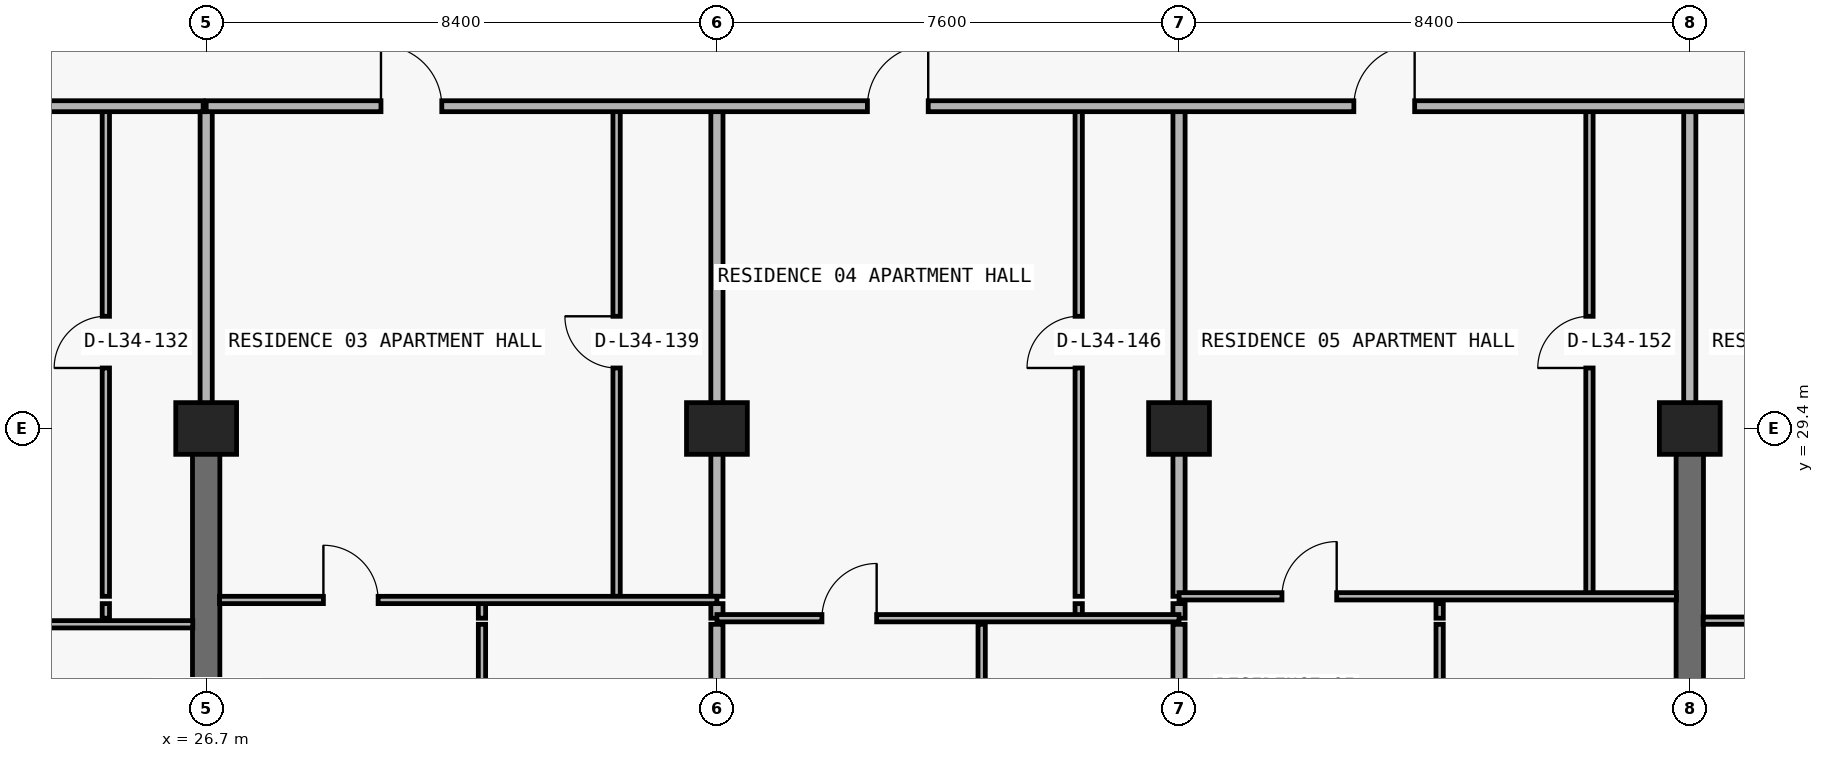
"""IFC4 building model, lengths in metres.
Left out: names, types, materials, properties, quantities, classifications, styles, units other than length and angle.
Written with IfcOpenShell. Run it as: python <this file> out.ifc"""

import sys

from ifc_helpers import new_model, si_unit, direction, frame, frame_2d, origin, origin_2d, place, context, subcontext, project, spatial, rectangle, extrude, element, fill, save


model = new_model("IFC4")
c1 = context("Model", 3, precision=1e-05, world=origin(), true_north=direction((0.0, 1.0)))
c2 = subcontext(c1, "Body", "Model", "MODEL_VIEW")
j1 = project(units=[si_unit("LENGTHUNIT", "METRE"), si_unit("PLANEANGLEUNIT", "RADIAN")], contexts=[c1])
p1 = place(None, origin())
s1 = spatial("IfcSite", under=j1, at=p1, CompositionType="ELEMENT")
p2 = place(p1, origin())
s2 = spatial("IfcBuilding", under=s1, at=p2, CompositionType="ELEMENT")
p3 = place(p2, frame((0.0, 0.0, 125.7)))
s3 = spatial("IfcBuildingStorey", under=s2, at=p3, CompositionType="ELEMENT", Elevation=125.7)
for number, where, z_axis, x_axis in (
    (1, (26.7, 29.4, 0.0), (0.0, 0.0, 1.0), (1.0, 0.0, 0.0)),
    (2, (35.1, 29.4, 0.0), (0.0, 0.0, 1.0), (1.0, 0.0, 0.0)),
    (3, (42.7, 29.4, 0.0), (0.0, 0.0, 1.0), (1.0, 0.0, 0.0)),
    (4, (51.1, 29.4, 0.0), (0.0, 0.0, 1.0), (1.0, 0.0, 0.0)),
):
    element("IfcColumn", number, at=place(p3, frame(where, z_axis=z_axis, x_axis=x_axis)), inside=s3, PredefinedType="COLUMN", context=c2, shape_type="SweptSolid", body=[
        extrude(rectangle(XDim=1.0, YDim=0.85, at=origin_2d()), origin(), (0.0, 0.0, 1.0), 3.05),
    ])
for number, where, z_axis, x_axis in (
    (5, (26.7, 20.8, 0.0), (0.0, 0.0, 1.0), (0.0, 1.0, 0.0)),
    (6, (51.1, 20.8, 0.0), (0.0, 0.0, 1.0), (0.0, 1.0, 0.0)),
):
    element("IfcWall", number, at=place(p3, frame(where, z_axis=z_axis, x_axis=x_axis)), inside=s3, PredefinedType="SHEAR", context=c2, shape_type="SweptSolid", body=[
        extrude(rectangle(XDim=8.6, YDim=0.45, at=frame_2d((4.3, 0.0))), origin(), (0.0, 0.0, 1.0), 3.05),
    ])
p4 = place(p3, frame((25.05, 26.28, 0.0), z_axis=(0.0, 0.0, 1.0), x_axis=(0.0, 1.0, 0.0)))
e7 = element("IfcWall", 7, at=p4, inside=s3, PredefinedType="PARTITIONING", context=c2, shape_type="SweptSolid", body=[
    extrude(rectangle(XDim=0.24, YDim=0.12, at=frame_2d((0.12, 0.0))), origin(), (0.0, 0.0, 1.0), 3.05),
])
p5 = place(p3, frame((25.05, 26.64, 0.0), z_axis=(0.0, 0.0, 1.0), x_axis=(0.0, 1.0, 0.0)))
e8 = element("IfcWall", 8, at=p5, inside=s3, PredefinedType="PARTITIONING", context=c2, shape_type="SweptSolid", body=[
    extrude(rectangle(XDim=8.06, YDim=0.12, at=frame_2d((4.03, 0.0))), origin(), (0.0, 0.0, 1.0), 3.05),
])
p6 = place(p5, frame((3.755, 0.0, 0.0)))
e9 = element("IfcOpeningElement", 9, at=p6, cuts=e8, PredefinedType="OPENING", context=c2, shape_type="SweptSolid", body=[
    extrude(rectangle(XDim=0.85, YDim=2.1, at=frame_2d((0.425, 1.05))), frame((0.0, 0.07, 0.0), z_axis=(0.0, -1.0, 0.0), x_axis=(1.0, 0.0, 0.0)), (0.0, 0.0, 1.0), 0.14),
])
p7 = place(p3, frame((26.7, 29.405, 0.0), z_axis=(0.0, 0.0, 1.0), x_axis=(0.0, 1.0, 0.0)))
e10 = element("IfcWall", 10, at=p7, inside=s3, PredefinedType="PARTITIONING", context=c2, shape_type="SweptSolid", body=[
    extrude(rectangle(XDim=5.295, YDim=0.2, at=frame_2d((2.647, 0.0))), origin(), (0.0, 0.0, 1.0), 2.335),
])
p8 = place(p3, frame((31.236, 21.49, 0.0), z_axis=(0.0, 0.0, 1.0), x_axis=(0.0, 1.0, 0.0)))
e11 = element("IfcWall", 11, at=p8, inside=s3, PredefinedType="PARTITIONING", context=c2, shape_type="SweptSolid", body=[
    extrude(rectangle(XDim=4.69, YDim=0.12, at=frame_2d((2.345, 0.0))), origin(), (0.0, 0.0, 1.0), 3.05),
])
p9 = place(p8, frame((1.895, 0.0, 0.0)))
e12 = element("IfcOpeningElement", 12, at=p9, cuts=e11, PredefinedType="OPENING", context=c2, shape_type="SweptSolid", body=[
    extrude(rectangle(XDim=0.9, YDim=2.15, at=frame_2d((0.45, 1.075))), frame((0.0, 0.07, 0.0), z_axis=(0.0, -1.0, 0.0), x_axis=(1.0, 0.0, 0.0)), (0.0, 0.0, 1.0), 0.14),
])
p10 = place(p3, frame((31.236, 26.28, 0.0), z_axis=(0.0, 0.0, 1.0), x_axis=(0.0, 1.0, 0.0)))
e13 = element("IfcWall", 13, at=p10, inside=s3, PredefinedType="PARTITIONING", context=c2, shape_type="SweptSolid", body=[
    extrude(rectangle(XDim=0.24, YDim=0.12, at=frame_2d((0.12, 0.0))), origin(), (0.0, 0.0, 1.0), 3.05),
])
p11 = place(p3, frame((33.45, 26.64, 0.0), z_axis=(0.0, 0.0, 1.0), x_axis=(0.0, 1.0, 0.0)))
e14 = element("IfcWall", 14, at=p11, inside=s3, PredefinedType="PARTITIONING", context=c2, shape_type="SweptSolid", body=[
    extrude(rectangle(XDim=8.06, YDim=0.12, at=frame_2d((4.03, 0.0))), origin(), (0.0, 0.0, 1.0), 3.05),
])
p12 = place(p11, frame((3.755, 0.0, 0.0)))
e15 = element("IfcOpeningElement", 15, at=p12, cuts=e14, PredefinedType="OPENING", context=c2, shape_type="SweptSolid", body=[
    extrude(rectangle(XDim=0.85, YDim=2.1, at=frame_2d((0.425, 1.05))), frame((0.0, 0.07, 0.0), z_axis=(0.0, -1.0, 0.0), x_axis=(1.0, 0.0, 0.0)), (0.0, 0.0, 1.0), 0.14),
])
p13 = place(p3, frame((35.1, 21.49, 0.0), z_axis=(0.0, 0.0, 1.0), x_axis=(0.0, 1.0, 0.0)))
e16 = element("IfcWall", 16, at=p13, inside=s3, PredefinedType="PARTITIONING", context=c2, shape_type="SweptSolid", body=[
    extrude(rectangle(XDim=4.69, YDim=0.2, at=frame_2d((2.345, 0.0))), origin(), (0.0, 0.0, 1.0), 2.174),
])
p14 = place(p3, frame((35.1, 26.28, 0.0), z_axis=(0.0, 0.0, 1.0), x_axis=(0.0, 1.0, 0.0)))
e17 = element("IfcWall", 17, at=p14, inside=s3, PredefinedType="PARTITIONING", context=c2, shape_type="SweptSolid", body=[
    extrude(rectangle(XDim=0.24, YDim=0.2, at=frame_2d((0.12, 0.0))), origin(), (0.0, 0.0, 1.0), 2.174),
])
p15 = place(p3, frame((35.1, 26.64, 0.0), z_axis=(0.0, 0.0, 1.0), x_axis=(0.0, 1.0, 0.0)))
e18 = element("IfcWall", 18, at=p15, inside=s3, PredefinedType="PARTITIONING", context=c2, shape_type="SweptSolid", body=[
    extrude(rectangle(XDim=8.06, YDim=0.2, at=frame_2d((4.03, 0.0))), origin(), (0.0, 0.0, 1.0), 2.174),
])
p16 = place(p3, frame((39.454, 21.49, 0.0), z_axis=(0.0, 0.0, 1.0), x_axis=(0.0, 1.0, 0.0)))
e19 = element("IfcWall", 19, at=p16, inside=s3, PredefinedType="PARTITIONING", context=c2, shape_type="SweptSolid", body=[
    extrude(rectangle(XDim=4.69, YDim=0.12, at=frame_2d((2.345, 0.0))), origin(), (0.0, 0.0, 1.0), 3.05),
])
p17 = place(p16, frame((1.895, 0.0, 0.0)))
e20 = element("IfcOpeningElement", 20, at=p17, cuts=e19, PredefinedType="OPENING", context=c2, shape_type="SweptSolid", body=[
    extrude(rectangle(XDim=0.9, YDim=2.15, at=frame_2d((0.45, 1.075))), frame((0.0, 0.07, 0.0), z_axis=(0.0, -1.0, 0.0), x_axis=(1.0, 0.0, 0.0)), (0.0, 0.0, 1.0), 0.14),
])
p18 = place(p3, frame((41.05, 26.28, 0.0), z_axis=(0.0, 0.0, 1.0), x_axis=(0.0, 1.0, 0.0)))
e21 = element("IfcWall", 21, at=p18, inside=s3, PredefinedType="PARTITIONING", context=c2, shape_type="SweptSolid", body=[
    extrude(rectangle(XDim=0.24, YDim=0.12, at=frame_2d((0.12, 0.0))), origin(), (0.0, 0.0, 1.0), 3.05),
])
p19 = place(p3, frame((41.05, 26.64, 0.0), z_axis=(0.0, 0.0, 1.0), x_axis=(0.0, 1.0, 0.0)))
e22 = element("IfcWall", 22, at=p19, inside=s3, PredefinedType="PARTITIONING", context=c2, shape_type="SweptSolid", body=[
    extrude(rectangle(XDim=8.06, YDim=0.12, at=frame_2d((4.03, 0.0))), origin(), (0.0, 0.0, 1.0), 3.05),
])
p20 = place(p19, frame((3.755, 0.0, 0.0)))
e23 = element("IfcOpeningElement", 23, at=p20, cuts=e22, PredefinedType="OPENING", context=c2, shape_type="SweptSolid", body=[
    extrude(rectangle(XDim=0.85, YDim=2.1, at=frame_2d((0.425, 1.05))), frame((0.0, 0.07, 0.0), z_axis=(0.0, -1.0, 0.0), x_axis=(1.0, 0.0, 0.0)), (0.0, 0.0, 1.0), 0.14),
])
p21 = place(p3, frame((42.7, 21.49, 0.0), z_axis=(0.0, 0.0, 1.0), x_axis=(0.0, 1.0, 0.0)))
e24 = element("IfcWall", 24, at=p21, inside=s3, PredefinedType="PARTITIONING", context=c2, shape_type="SweptSolid", body=[
    extrude(rectangle(XDim=4.69, YDim=0.2, at=frame_2d((2.345, 0.0))), origin(), (0.0, 0.0, 1.0), 2.174),
])
p22 = place(p3, frame((42.7, 26.28, 0.0), z_axis=(0.0, 0.0, 1.0), x_axis=(0.0, 1.0, 0.0)))
e25 = element("IfcWall", 25, at=p22, inside=s3, PredefinedType="PARTITIONING", context=c2, shape_type="SweptSolid", body=[
    extrude(rectangle(XDim=0.24, YDim=0.2, at=frame_2d((0.12, 0.0))), origin(), (0.0, 0.0, 1.0), 2.174),
])
p23 = place(p3, frame((42.7, 26.64, 0.0), z_axis=(0.0, 0.0, 1.0), x_axis=(0.0, 1.0, 0.0)))
e26 = element("IfcWall", 26, at=p23, inside=s3, PredefinedType="PARTITIONING", context=c2, shape_type="SweptSolid", body=[
    extrude(rectangle(XDim=8.06, YDim=0.2, at=frame_2d((4.03, 0.0))), origin(), (0.0, 0.0, 1.0), 2.174),
])
p24 = place(p3, frame((46.986, 21.49, 0.0), z_axis=(0.0, 0.0, 1.0), x_axis=(0.0, 1.0, 0.0)))
e27 = element("IfcWall", 27, at=p24, inside=s3, PredefinedType="PARTITIONING", context=c2, shape_type="SweptSolid", body=[
    extrude(rectangle(XDim=4.69, YDim=0.12, at=frame_2d((2.345, 0.0))), origin(), (0.0, 0.0, 1.0), 3.05),
])
p25 = place(p24, frame((1.895, 0.0, 0.0)))
e28 = element("IfcOpeningElement", 28, at=p25, cuts=e27, PredefinedType="OPENING", context=c2, shape_type="SweptSolid", body=[
    extrude(rectangle(XDim=0.9, YDim=2.15, at=frame_2d((0.45, 1.075))), frame((0.0, 0.07, 0.0), z_axis=(0.0, -1.0, 0.0), x_axis=(1.0, 0.0, 0.0)), (0.0, 0.0, 1.0), 0.14),
])
p26 = place(p3, frame((46.986, 26.28, 0.0), z_axis=(0.0, 0.0, 1.0), x_axis=(0.0, 1.0, 0.0)))
e29 = element("IfcWall", 29, at=p26, inside=s3, PredefinedType="PARTITIONING", context=c2, shape_type="SweptSolid", body=[
    extrude(rectangle(XDim=0.24, YDim=0.12, at=frame_2d((0.12, 0.0))), origin(), (0.0, 0.0, 1.0), 3.05),
])
p27 = place(p3, frame((49.45, 26.64, 0.0), z_axis=(0.0, 0.0, 1.0), x_axis=(0.0, 1.0, 0.0)))
e30 = element("IfcWall", 30, at=p27, inside=s3, PredefinedType="PARTITIONING", context=c2, shape_type="SweptSolid", body=[
    extrude(rectangle(XDim=8.06, YDim=0.12, at=frame_2d((4.03, 0.0))), origin(), (0.0, 0.0, 1.0), 3.05),
])
p28 = place(p27, frame((3.755, 0.0, 0.0)))
e31 = element("IfcOpeningElement", 31, at=p28, cuts=e30, PredefinedType="OPENING", context=c2, shape_type="SweptSolid", body=[
    extrude(rectangle(XDim=0.85, YDim=2.1, at=frame_2d((0.425, 1.05))), frame((0.0, 0.07, 0.0), z_axis=(0.0, -1.0, 0.0), x_axis=(1.0, 0.0, 0.0)), (0.0, 0.0, 1.0), 0.14),
])
p29 = place(p3, frame((51.1, 29.405, 0.0), z_axis=(0.0, 0.0, 1.0), x_axis=(0.0, 1.0, 0.0)))
e32 = element("IfcWall", 32, at=p29, inside=s3, PredefinedType="PARTITIONING", context=c2, shape_type="SweptSolid", body=[
    extrude(rectangle(XDim=5.295, YDim=0.2, at=frame_2d((2.647, 0.0))), origin(), (0.0, 0.0, 1.0), 2.335),
])
p30 = place(p3, frame((18.3, 26.18, 0.0), z_axis=(0.0, 0.0, 1.0), x_axis=(1.0, 0.0, 0.0)))
e33 = element("IfcWall", 33, at=p30, inside=s3, PredefinedType="PARTITIONING", context=c2, shape_type="SweptSolid", body=[
    extrude(rectangle(XDim=8.18, YDim=0.12, at=frame_2d((4.09, 0.0))), origin(), (0.0, 0.0, 1.0), 3.05),
])
p31 = place(p30, frame((1.693, 0.0, 0.0)))
e34 = element("IfcOpeningElement", 34, at=p31, cuts=e33, PredefinedType="OPENING", context=c2, shape_type="SweptSolid", body=[
    extrude(rectangle(XDim=0.9, YDim=2.15, at=frame_2d((0.45, 1.075))), frame((0.0, 0.07, 0.0), z_axis=(0.0, -1.0, 0.0), x_axis=(1.0, 0.0, 0.0)), (0.0, 0.0, 1.0), 0.14),
])
p32 = place(p3, frame((51.32, 26.24, 0.0), z_axis=(0.0, 0.0, 1.0), x_axis=(1.0, 0.0, 0.0)))
e35 = element("IfcWall", 35, at=p32, inside=s3, PredefinedType="PARTITIONING", context=c2, shape_type="SweptSolid", body=[
    extrude(rectangle(XDim=8.18, YDim=0.12, at=frame_2d((4.09, 0.0))), origin(), (0.0, 0.0, 1.0), 3.05),
])
p33 = place(p32, frame((1.708, 0.0, 0.0)))
e36 = element("IfcOpeningElement", 36, at=p33, cuts=e35, PredefinedType="OPENING", context=c2, shape_type="SweptSolid", body=[
    extrude(rectangle(XDim=0.9, YDim=2.15, at=frame_2d((0.45, 1.075))), frame((0.0, 0.07, 0.0), z_axis=(0.0, -1.0, 0.0), x_axis=(1.0, 0.0, 0.0)), (0.0, 0.0, 1.0), 0.14),
])
p34 = place(p3, frame((35.1, 26.28, 0.0), z_axis=(0.0, 0.0, 1.0), x_axis=(1.0, 0.0, 0.0)))
e37 = element("IfcWall", 37, at=p34, inside=s3, PredefinedType="PARTITIONING", context=c2, shape_type="SweptSolid", body=[
    extrude(rectangle(XDim=7.6, YDim=0.12, at=frame_2d((3.8, 0.0))), origin(), (0.0, 0.0, 1.0), 3.05),
])
p35 = place(p34, frame((1.727, 0.0, 0.0)))
e38 = element("IfcOpeningElement", 38, at=p35, cuts=e37, PredefinedType="OPENING", context=c2, shape_type="SweptSolid", body=[
    extrude(rectangle(XDim=0.9, YDim=2.15, at=frame_2d((0.45, 1.075))), frame((0.0, 0.07, 0.0), z_axis=(0.0, -1.0, 0.0), x_axis=(1.0, 0.0, 0.0)), (0.0, 0.0, 1.0), 0.14),
])
p36 = place(p3, frame((26.92, 26.58, 0.0), z_axis=(0.0, 0.0, 1.0), x_axis=(1.0, 0.0, 0.0)))
e39 = element("IfcWall", 39, at=p36, inside=s3, PredefinedType="PARTITIONING", context=c2, shape_type="SweptSolid", body=[
    extrude(rectangle(XDim=8.18, YDim=0.12, at=frame_2d((4.09, 0.0))), origin(), (0.0, 0.0, 1.0), 3.05),
])
p37 = place(p36, frame((1.708, 0.0, 0.0)))
e40 = element("IfcOpeningElement", 40, at=p37, cuts=e39, PredefinedType="OPENING", context=c2, shape_type="SweptSolid", body=[
    extrude(rectangle(XDim=0.9, YDim=2.15, at=frame_2d((0.45, 1.075))), frame((0.0, 0.07, 0.0), z_axis=(0.0, -1.0, 0.0), x_axis=(1.0, 0.0, 0.0)), (0.0, 0.0, 1.0), 0.14),
])
p38 = place(p3, frame((42.7, 26.64, 0.0), z_axis=(0.0, 0.0, 1.0), x_axis=(1.0, 0.0, 0.0)))
e41 = element("IfcWall", 41, at=p38, inside=s3, PredefinedType="PARTITIONING", context=c2, shape_type="SweptSolid", body=[
    extrude(rectangle(XDim=8.18, YDim=0.12, at=frame_2d((4.09, 0.0))), origin(), (0.0, 0.0, 1.0), 3.05),
])
p39 = place(p38, frame((1.693, 0.0, 0.0)))
e42 = element("IfcOpeningElement", 42, at=p39, cuts=e41, PredefinedType="OPENING", context=c2, shape_type="SweptSolid", body=[
    extrude(rectangle(XDim=0.9, YDim=2.15, at=frame_2d((0.45, 1.075))), frame((0.0, 0.07, 0.0), z_axis=(0.0, -1.0, 0.0), x_axis=(1.0, 0.0, 0.0)), (0.0, 0.0, 1.0), 0.14),
])
p40 = place(p3, frame((18.3, 34.7, 0.0), z_axis=(0.0, 0.0, 1.0), x_axis=(1.0, 0.0, 0.0)))
e43 = element("IfcWall", 43, at=p40, inside=s3, PredefinedType="PARTITIONING", context=c2, shape_type="SweptSolid", body=[
    extrude(rectangle(XDim=8.35, YDim=0.18, at=frame_2d((4.175, 0.0))), origin(), (0.0, 0.0, 1.0), 3.05),
])
p41 = place(p40, frame((2.875, 0.0, 0.0)))
e44 = element("IfcOpeningElement", 44, at=p41, cuts=e43, PredefinedType="OPENING", context=c2, shape_type="SweptSolid", body=[
    extrude(rectangle(XDim=1.0, YDim=2.2, at=frame_2d((0.5, 1.1))), frame((0.0, 0.1, 0.0), z_axis=(0.0, -1.0, 0.0), x_axis=(1.0, 0.0, 0.0)), (0.0, 0.0, 1.0), 0.2),
])
p42 = place(p3, frame((26.7, 34.7, 0.0), z_axis=(0.0, 0.0, 1.0), x_axis=(1.0, 0.0, 0.0)))
e45 = element("IfcWall", 45, at=p42, inside=s3, PredefinedType="PARTITIONING", context=c2, shape_type="SweptSolid", body=[
    extrude(rectangle(XDim=32.8, YDim=0.18, at=frame_2d((16.4, 0.0))), origin(), (0.0, 0.0, 1.0), 3.05),
])
p43 = place(p42, frame((2.875, 0.0, 0.0)))
e46 = element("IfcOpeningElement", 46, at=p43, cuts=e45, PredefinedType="OPENING", context=c2, shape_type="SweptSolid", body=[
    extrude(rectangle(XDim=1.0, YDim=2.2, at=frame_2d((0.5, 1.1))), frame((0.0, 0.1, 0.0), z_axis=(0.0, -1.0, 0.0), x_axis=(1.0, 0.0, 0.0)), (0.0, 0.0, 1.0), 0.2),
])
p44 = place(p42, frame((10.875, 0.0, 0.0)))
e47 = element("IfcOpeningElement", 47, at=p44, cuts=e45, PredefinedType="OPENING", context=c2, shape_type="SweptSolid", body=[
    extrude(rectangle(XDim=1.0, YDim=2.2, at=frame_2d((0.5, 1.1))), frame((0.0, 0.1, 0.0), z_axis=(0.0, -1.0, 0.0), x_axis=(1.0, 0.0, 0.0)), (0.0, 0.0, 1.0), 0.2),
])
p45 = place(p42, frame((18.875, 0.0, 0.0)))
e48 = element("IfcOpeningElement", 48, at=p45, cuts=e45, PredefinedType="OPENING", context=c2, shape_type="SweptSolid", body=[
    extrude(rectangle(XDim=1.0, YDim=2.2, at=frame_2d((0.5, 1.1))), frame((0.0, 0.1, 0.0), z_axis=(0.0, -1.0, 0.0), x_axis=(1.0, 0.0, 0.0)), (0.0, 0.0, 1.0), 0.2),
])
p46 = place(p42, frame((27.275, 0.0, 0.0)))
e49 = element("IfcOpeningElement", 49, at=p46, cuts=e45, PredefinedType="OPENING", context=c2, shape_type="SweptSolid", body=[
    extrude(rectangle(XDim=1.0, YDim=2.2, at=frame_2d((0.5, 1.1))), frame((0.0, 0.1, 0.0), z_axis=(0.0, -1.0, 0.0), x_axis=(1.0, 0.0, 0.0)), (0.0, 0.0, 1.0), 0.2),
])
p47 = place(p6, origin())
e50 = element("IfcDoor", 50, at=p47, inside=s3, OperationType="SINGLE_SWING_LEFT", PredefinedType="DOOR", context=c2, shape_type="SweptSolid", body=[
    extrude(rectangle(XDim=0.85, YDim=2.1, at=frame_2d((0.425, 1.05))), frame((0.0, 0.025, 0.0), z_axis=(0.0, -1.0, 0.0), x_axis=(1.0, 0.0, 0.0)), (0.0, 0.0, 1.0), 0.05),
])
fill(e9, e50)
p48 = place(p43, origin())
e51 = element("IfcDoor", 51, at=p48, inside=s3, OperationType="SINGLE_SWING_LEFT", PredefinedType="DOOR", context=c2, shape_type="SweptSolid", body=[
    extrude(rectangle(XDim=1.0, YDim=2.2, at=frame_2d((0.5, 1.1))), frame((0.0, 0.025, 0.0), z_axis=(0.0, -1.0, 0.0), x_axis=(1.0, 0.0, 0.0)), (0.0, 0.0, 1.0), 0.05),
])
fill(e46, e51)
p49 = place(p12, origin())
e52 = element("IfcDoor", 52, at=p49, inside=s3, OperationType="SINGLE_SWING_RIGHT", PredefinedType="DOOR", context=c2, shape_type="SweptSolid", body=[
    extrude(rectangle(XDim=0.85, YDim=2.1, at=frame_2d((0.425, 1.05))), frame((0.0, 0.025, 0.0), z_axis=(0.0, -1.0, 0.0), x_axis=(1.0, 0.0, 0.0)), (0.0, 0.0, 1.0), 0.05),
])
fill(e15, e52)
p50 = place(p37, origin())
e53 = element("IfcDoor", 53, at=p50, inside=s3, OperationType="SINGLE_SWING_LEFT", PredefinedType="DOOR", context=c2, shape_type="SweptSolid", body=[
    extrude(rectangle(XDim=0.9, YDim=2.15, at=frame_2d((0.45, 1.075))), frame((0.0, 0.025, 0.0), z_axis=(0.0, -1.0, 0.0), x_axis=(1.0, 0.0, 0.0)), (0.0, 0.0, 1.0), 0.05),
])
fill(e40, e53)
p51 = place(p44, origin())
e54 = element("IfcDoor", 54, at=p51, inside=s3, OperationType="SINGLE_SWING_RIGHT", PredefinedType="DOOR", context=c2, shape_type="SweptSolid", body=[
    extrude(rectangle(XDim=1.0, YDim=2.2, at=frame_2d((0.5, 1.1))), frame((0.0, 0.025, 0.0), z_axis=(0.0, -1.0, 0.0), x_axis=(1.0, 0.0, 0.0)), (0.0, 0.0, 1.0), 0.05),
])
fill(e47, e54)
p52 = place(p20, origin())
e55 = element("IfcDoor", 55, at=p52, inside=s3, OperationType="SINGLE_SWING_LEFT", PredefinedType="DOOR", context=c2, shape_type="SweptSolid", body=[
    extrude(rectangle(XDim=0.85, YDim=2.1, at=frame_2d((0.425, 1.05))), frame((0.0, 0.025, 0.0), z_axis=(0.0, -1.0, 0.0), x_axis=(1.0, 0.0, 0.0)), (0.0, 0.0, 1.0), 0.05),
])
fill(e23, e55)
p53 = place(p35, origin())
e56 = element("IfcDoor", 56, at=p53, inside=s3, OperationType="SINGLE_SWING_RIGHT", PredefinedType="DOOR", context=c2, shape_type="SweptSolid", body=[
    extrude(rectangle(XDim=0.9, YDim=2.15, at=frame_2d((0.45, 1.075))), frame((0.0, 0.025, 0.0), z_axis=(0.0, -1.0, 0.0), x_axis=(1.0, 0.0, 0.0)), (0.0, 0.0, 1.0), 0.05),
])
fill(e38, e56)
p54 = place(p45, origin())
e57 = element("IfcDoor", 57, at=p54, inside=s3, OperationType="SINGLE_SWING_RIGHT", PredefinedType="DOOR", context=c2, shape_type="SweptSolid", body=[
    extrude(rectangle(XDim=1.0, YDim=2.2, at=frame_2d((0.5, 1.1))), frame((0.0, 0.025, 0.0), z_axis=(0.0, -1.0, 0.0), x_axis=(1.0, 0.0, 0.0)), (0.0, 0.0, 1.0), 0.05),
])
fill(e48, e57)
p55 = place(p28, origin())
e58 = element("IfcDoor", 58, at=p55, inside=s3, OperationType="SINGLE_SWING_LEFT", PredefinedType="DOOR", context=c2, shape_type="SweptSolid", body=[
    extrude(rectangle(XDim=0.85, YDim=2.1, at=frame_2d((0.425, 1.05))), frame((0.0, 0.025, 0.0), z_axis=(0.0, -1.0, 0.0), x_axis=(1.0, 0.0, 0.0)), (0.0, 0.0, 1.0), 0.05),
])
fill(e31, e58)
p56 = place(p39, origin())
e59 = element("IfcDoor", 59, at=p56, inside=s3, OperationType="SINGLE_SWING_RIGHT", PredefinedType="DOOR", context=c2, shape_type="SweptSolid", body=[
    extrude(rectangle(XDim=0.9, YDim=2.15, at=frame_2d((0.45, 1.075))), frame((0.0, 0.025, 0.0), z_axis=(0.0, -1.0, 0.0), x_axis=(1.0, 0.0, 0.0)), (0.0, 0.0, 1.0), 0.05),
])
fill(e42, e59)
save(model, sys.argv[1])
